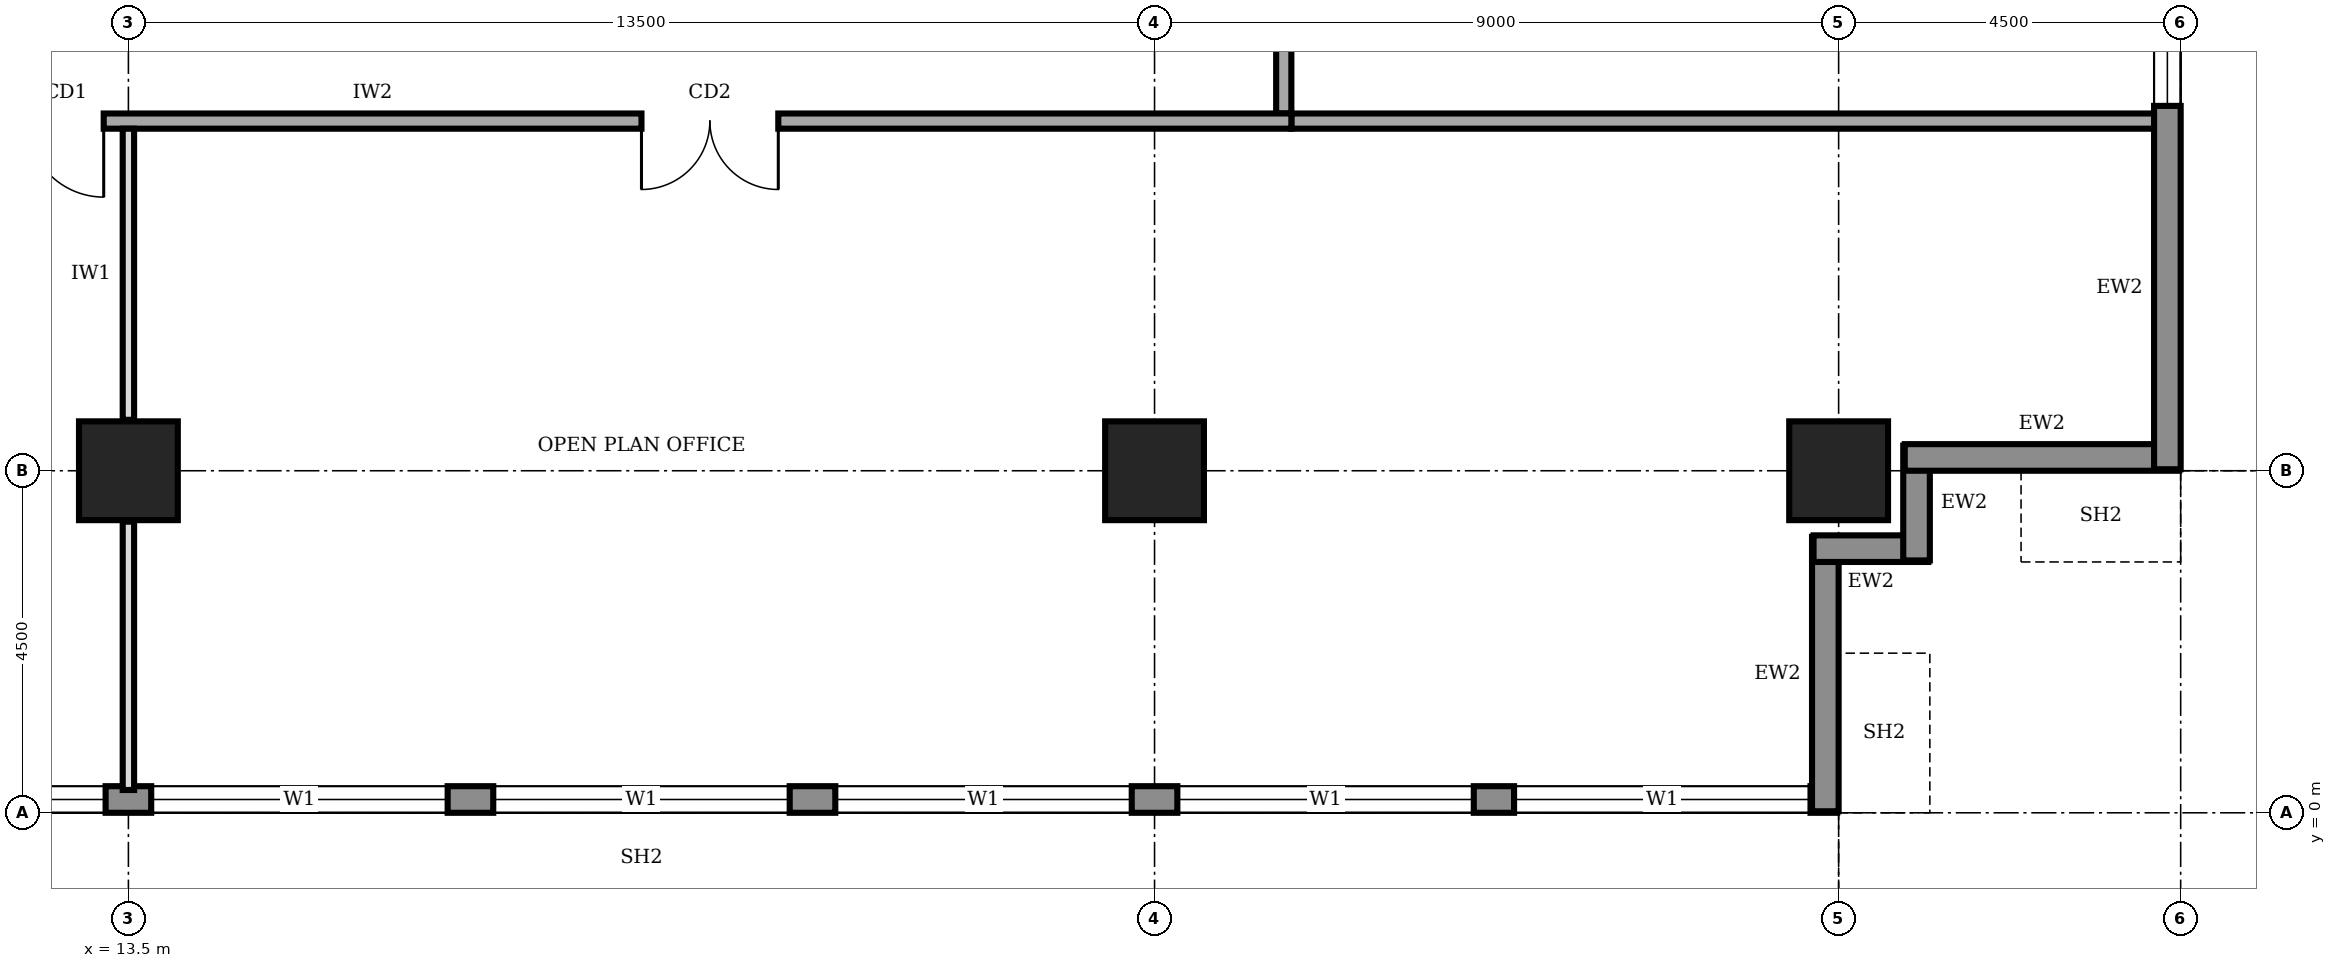
"""IFC4 building model, lengths in metres.
Left out: names, types, materials, properties, quantities, classifications, styles, units other than length and angle.
Written with IfcOpenShell. Run it as: python <this file> out.ifc"""

import sys

from ifc_helpers import new_model, si_unit, direction, frame, frame_2d, origin, origin_2d, place, context, subcontext, project, spatial, rectangle, extrude, element, fill, save


model = new_model("IFC4")
c1 = context("Model", 3, precision=1e-05, world=origin(), true_north=direction((0.0, 1.0)))
c2 = subcontext(c1, "Body", "Model", "MODEL_VIEW")
j1 = project(units=[si_unit("LENGTHUNIT", "METRE"), si_unit("PLANEANGLEUNIT", "RADIAN")], contexts=[c1])
p1 = place(None, origin())
s1 = spatial("IfcSite", under=j1, at=p1, CompositionType="ELEMENT")
p2 = place(p1, origin())
s2 = spatial("IfcBuilding", under=s1, at=p2, CompositionType="ELEMENT")
p3 = place(p2, frame((0.0, 0.0, 273.0)))
s3 = spatial("IfcBuildingStorey", under=s2, at=p3, CompositionType="ELEMENT", Elevation=273.0)
for number, where, z_axis, x_axis in (
    (1, (13.5, 4.5, 0.0), (0.0, 0.0, 1.0), (1.0, 0.0, 0.0)),
    (2, (27.0, 4.5, 0.0), (0.0, 0.0, 1.0), (1.0, 0.0, 0.0)),
    (3, (36.0, 4.5, 0.0), (0.0, 0.0, 1.0), (1.0, 0.0, 0.0)),
):
    element("IfcColumn", number, at=place(p3, frame(where, z_axis=z_axis, x_axis=x_axis)), inside=s3, PredefinedType="COLUMN", context=c2, shape_type="SweptSolid", body=[
        extrude(rectangle(XDim=1.3, YDim=1.3, at=origin_2d()), origin(), (0.0, 0.0, 1.0), 4.0),
    ])
p4 = place(p3, frame((4.52, 0.175, 0.0), z_axis=(0.0, 0.0, 1.0), x_axis=(1.0, 0.0, 0.0)))
e4 = element("IfcWall", 4, at=p4, inside=s3, PredefinedType="STANDARD", context=c2, shape_type="SweptSolid", body=[
    extrude(rectangle(XDim=31.46, YDim=0.35, at=frame_2d((15.73, 0.0))), origin(), (0.0, 0.0, 1.0), 3.75),
])
p5 = place(p4, frame((4.78, 0.0, 0.9)))
e5 = element("IfcOpeningElement", 5, at=p5, cuts=e4, PredefinedType="OPENING", context=c2, shape_type="SweptSolid", body=[
    extrude(rectangle(XDim=3.9, YDim=2.2, at=frame_2d((1.95, 1.1))), frame((0.0, 0.185, 0.0), z_axis=(0.0, -1.0, 0.0), x_axis=(1.0, 0.0, 0.0)), (0.0, 0.0, 1.0), 0.37),
])
p6 = place(p4, frame((9.28, 0.0, 0.9)))
e6 = element("IfcOpeningElement", 6, at=p6, cuts=e4, PredefinedType="OPENING", context=c2, shape_type="SweptSolid", body=[
    extrude(rectangle(XDim=3.9, YDim=2.2, at=frame_2d((1.95, 1.1))), frame((0.0, 0.185, 0.0), z_axis=(0.0, -1.0, 0.0), x_axis=(1.0, 0.0, 0.0)), (0.0, 0.0, 1.0), 0.37),
])
p7 = place(p4, frame((13.78, 0.0, 0.9)))
e7 = element("IfcOpeningElement", 7, at=p7, cuts=e4, PredefinedType="OPENING", context=c2, shape_type="SweptSolid", body=[
    extrude(rectangle(XDim=3.9, YDim=2.2, at=frame_2d((1.95, 1.1))), frame((0.0, 0.185, 0.0), z_axis=(0.0, -1.0, 0.0), x_axis=(1.0, 0.0, 0.0)), (0.0, 0.0, 1.0), 0.37),
])
p8 = place(p4, frame((18.28, 0.0, 0.9)))
e8 = element("IfcOpeningElement", 8, at=p8, cuts=e4, PredefinedType="OPENING", context=c2, shape_type="SweptSolid", body=[
    extrude(rectangle(XDim=3.9, YDim=2.2, at=frame_2d((1.95, 1.1))), frame((0.0, 0.185, 0.0), z_axis=(0.0, -1.0, 0.0), x_axis=(1.0, 0.0, 0.0)), (0.0, 0.0, 1.0), 0.37),
])
p9 = place(p4, frame((22.78, 0.0, 0.9)))
e9 = element("IfcOpeningElement", 9, at=p9, cuts=e4, PredefinedType="OPENING", context=c2, shape_type="SweptSolid", body=[
    extrude(rectangle(XDim=3.9, YDim=2.2, at=frame_2d((1.95, 1.1))), frame((0.0, 0.185, 0.0), z_axis=(0.0, -1.0, 0.0), x_axis=(1.0, 0.0, 0.0)), (0.0, 0.0, 1.0), 0.37),
])
p10 = place(p4, frame((27.21, 0.0, 0.9)))
e10 = element("IfcOpeningElement", 10, at=p10, cuts=e4, PredefinedType="OPENING", context=c2, shape_type="SweptSolid", body=[
    extrude(rectangle(XDim=3.9, YDim=2.2, at=frame_2d((1.95, 1.1))), frame((0.0, 0.185, 0.0), z_axis=(0.0, -1.0, 0.0), x_axis=(1.0, 0.0, 0.0)), (0.0, 0.0, 1.0), 0.37),
])
p11 = place(p3, frame((35.825, 0.02, 0.0), z_axis=(0.0, 0.0, 1.0), x_axis=(0.0, 1.0, 0.0)))
e11 = element("IfcWall", 11, at=p11, inside=s3, PredefinedType="STANDARD", context=c2, shape_type="SweptSolid", body=[
    extrude(rectangle(XDim=3.61, YDim=0.35, at=frame_2d((1.805, 0.0))), origin(), (0.0, 0.0, 1.0), 2.85),
])
for number, where, z_axis, x_axis in (
    (12, (35.67, 3.475, 0.0), (0.0, 0.0, 1.0), (1.0, 0.0, 0.0)),
    (13, (37.025, 3.32, 0.0), (0.0, 0.0, 1.0), (0.0, 1.0, 0.0)),
):
    element("IfcWall", number, at=place(p3, frame(where, z_axis=z_axis, x_axis=x_axis)), inside=s3, PredefinedType="STANDARD", context=c2, shape_type="SweptSolid", body=[
        extrude(rectangle(XDim=1.51, YDim=0.35, at=frame_2d((0.755, 0.0))), origin(), (0.0, 0.0, 1.0), 3.75),
    ])
p12 = place(p3, frame((36.87, 4.675, 0.0), z_axis=(0.0, 0.0, 1.0), x_axis=(1.0, 0.0, 0.0)))
e14 = element("IfcWall", 14, at=p12, inside=s3, PredefinedType="STANDARD", context=c2, shape_type="SweptSolid", body=[
    extrude(rectangle(XDim=3.61, YDim=0.35, at=frame_2d((1.805, 0.0))), origin(), (0.0, 0.0, 1.0), 2.85),
])
p13 = place(p3, frame((40.325, 4.52, 0.0), z_axis=(0.0, 0.0, 1.0), x_axis=(0.0, 1.0, 0.0)))
e15 = element("IfcWall", 15, at=p13, inside=s3, PredefinedType="STANDARD", context=c2, shape_type="SweptSolid", body=[
    extrude(rectangle(XDim=31.46, YDim=0.35, at=frame_2d((15.73, 0.0))), origin(), (0.0, 0.0, 1.0), 3.75),
])
p14 = place(p13, frame((4.78, 0.0, 0.9)))
e16 = element("IfcOpeningElement", 16, at=p14, cuts=e15, PredefinedType="OPENING", context=c2, shape_type="SweptSolid", body=[
    extrude(rectangle(XDim=3.9, YDim=2.2, at=frame_2d((1.95, 1.1))), frame((0.0, 0.185, 0.0), z_axis=(0.0, -1.0, 0.0), x_axis=(1.0, 0.0, 0.0)), (0.0, 0.0, 1.0), 0.37),
])
p15 = place(p13, frame((9.28, 0.0, 0.9)))
e17 = element("IfcOpeningElement", 17, at=p15, cuts=e15, PredefinedType="OPENING", context=c2, shape_type="SweptSolid", body=[
    extrude(rectangle(XDim=3.9, YDim=2.2, at=frame_2d((1.95, 1.1))), frame((0.0, 0.185, 0.0), z_axis=(0.0, -1.0, 0.0), x_axis=(1.0, 0.0, 0.0)), (0.0, 0.0, 1.0), 0.37),
])
p16 = place(p13, frame((13.78, 0.0, 0.9)))
e18 = element("IfcOpeningElement", 18, at=p16, cuts=e15, PredefinedType="OPENING", context=c2, shape_type="SweptSolid", body=[
    extrude(rectangle(XDim=3.9, YDim=2.2, at=frame_2d((1.95, 1.1))), frame((0.0, 0.185, 0.0), z_axis=(0.0, -1.0, 0.0), x_axis=(1.0, 0.0, 0.0)), (0.0, 0.0, 1.0), 0.37),
])
p17 = place(p13, frame((18.28, 0.0, 0.9)))
e19 = element("IfcOpeningElement", 19, at=p17, cuts=e15, PredefinedType="OPENING", context=c2, shape_type="SweptSolid", body=[
    extrude(rectangle(XDim=3.9, YDim=2.2, at=frame_2d((1.95, 1.1))), frame((0.0, 0.185, 0.0), z_axis=(0.0, -1.0, 0.0), x_axis=(1.0, 0.0, 0.0)), (0.0, 0.0, 1.0), 0.37),
])
p18 = place(p13, frame((22.78, 0.0, 0.9)))
e20 = element("IfcOpeningElement", 20, at=p18, cuts=e15, PredefinedType="OPENING", context=c2, shape_type="SweptSolid", body=[
    extrude(rectangle(XDim=3.9, YDim=2.2, at=frame_2d((1.95, 1.1))), frame((0.0, 0.185, 0.0), z_axis=(0.0, -1.0, 0.0), x_axis=(1.0, 0.0, 0.0)), (0.0, 0.0, 1.0), 0.37),
])
p19 = place(p13, frame((27.21, 0.0, 0.9)))
e21 = element("IfcOpeningElement", 21, at=p19, cuts=e15, PredefinedType="OPENING", context=c2, shape_type="SweptSolid", body=[
    extrude(rectangle(XDim=3.9, YDim=2.2, at=frame_2d((1.95, 1.1))), frame((0.0, 0.185, 0.0), z_axis=(0.0, -1.0, 0.0), x_axis=(1.0, 0.0, 0.0)), (0.0, 0.0, 1.0), 0.37),
])
p20 = place(p3, frame((11.9, 9.1, 0.0), z_axis=(0.0, 0.0, 1.0), x_axis=(1.0, 0.0, 0.0)))
e22 = element("IfcWall", 22, at=p20, inside=s3, PredefinedType="SOLIDWALL", context=c2, shape_type="SweptSolid", body=[
    extrude(rectangle(XDim=16.9, YDim=0.2, at=frame_2d((8.45, 0.0))), origin(), (0.0, 0.0, 1.0), 3.75),
])
p21 = place(p20, frame((0.275, 0.0, 0.0)))
e23 = element("IfcOpeningElement", 23, at=p21, cuts=e22, PredefinedType="OPENING", context=c2, shape_type="SweptSolid", body=[
    extrude(rectangle(XDim=1.0, YDim=2.1, at=frame_2d((0.5, 1.05))), frame((0.0, 0.11, 0.0), z_axis=(0.0, -1.0, 0.0), x_axis=(1.0, 0.0, 0.0)), (0.0, 0.0, 1.0), 0.22),
])
p22 = place(p20, frame((8.35, 0.0, 0.0)))
e24 = element("IfcOpeningElement", 24, at=p22, cuts=e22, PredefinedType="OPENING", context=c2, shape_type="SweptSolid", body=[
    extrude(rectangle(XDim=1.8, YDim=2.1, at=frame_2d((0.9, 1.05))), frame((0.0, 0.11, 0.0), z_axis=(0.0, -1.0, 0.0), x_axis=(1.0, 0.0, 0.0)), (0.0, 0.0, 1.0), 0.22),
])
p23 = place(p3, frame((28.7, 9.2, 0.0), z_axis=(0.0, 0.0, 1.0), x_axis=(0.0, 1.0, 0.0)))
e25 = element("IfcWall", 25, at=p23, inside=s3, PredefinedType="SOLIDWALL", context=c2, shape_type="SweptSolid", body=[
    extrude(rectangle(XDim=23.8, YDim=0.2, at=frame_2d((11.9, 0.0))), origin(), (0.0, 0.0, 1.0), 3.75),
])
p24 = place(p23, frame((3.4, 0.0, 0.0)))
e26 = element("IfcOpeningElement", 26, at=p24, cuts=e25, PredefinedType="OPENING", context=c2, shape_type="SweptSolid", body=[
    extrude(rectangle(XDim=1.8, YDim=2.1, at=frame_2d((0.9, 1.05))), frame((0.0, 0.11, 0.0), z_axis=(0.0, -1.0, 0.0), x_axis=(1.0, 0.0, 0.0)), (0.0, 0.0, 1.0), 0.22),
])
p25 = place(p23, frame((10.55, 0.0, 0.0)))
e27 = element("IfcOpeningElement", 27, at=p25, cuts=e25, PredefinedType="OPENING", context=c2, shape_type="SweptSolid", body=[
    extrude(rectangle(XDim=1.0, YDim=2.1, at=frame_2d((0.5, 1.05))), frame((0.0, 0.11, 0.0), z_axis=(0.0, -1.0, 0.0), x_axis=(1.0, 0.0, 0.0)), (0.0, 0.0, 1.0), 0.22),
])
p26 = place(p23, frame((17.65, 0.0, 0.0)))
e28 = element("IfcOpeningElement", 28, at=p26, cuts=e25, PredefinedType="OPENING", context=c2, shape_type="SweptSolid", body=[
    extrude(rectangle(XDim=1.8, YDim=2.1, at=frame_2d((0.9, 1.05))), frame((0.0, 0.11, 0.0), z_axis=(0.0, -1.0, 0.0), x_axis=(1.0, 0.0, 0.0)), (0.0, 0.0, 1.0), 0.22),
])
p27 = place(p3, frame((28.8, 9.1, 0.0), z_axis=(0.0, 0.0, 1.0), x_axis=(1.0, 0.0, 0.0)))
e29 = element("IfcWall", 29, at=p27, inside=s3, PredefinedType="SOLIDWALL", context=c2, shape_type="SweptSolid", body=[
    extrude(rectangle(XDim=11.4, YDim=0.2, at=frame_2d((5.7, 0.0))), origin(), (0.0, 0.0, 1.0), 3.75),
])
p28 = place(p3, frame((13.5, 0.3, 0.0), z_axis=(0.0, 0.0, 1.0), x_axis=(0.0, 1.0, 0.0)))
e30 = element("IfcWall", 30, at=p28, inside=s3, PredefinedType="PARTITIONING", context=c2, shape_type="SweptSolid", body=[
    extrude(rectangle(XDim=3.53, YDim=0.15, at=frame_2d((1.765, 0.0))), origin(), (0.0, 0.0, 1.0), 2.85),
])
p29 = place(p3, frame((13.5, 5.17, 0.0), z_axis=(0.0, 0.0, 1.0), x_axis=(0.0, 1.0, 0.0)))
e31 = element("IfcWall", 31, at=p29, inside=s3, PredefinedType="PARTITIONING", context=c2, shape_type="SweptSolid", body=[
    extrude(rectangle(XDim=3.83, YDim=0.15, at=frame_2d((1.915, 0.0))), origin(), (0.0, 0.0, 1.0), 2.85),
])
p30 = place(p5, origin())
e32 = element("IfcWindow", 32, at=p30, inside=s3, PartitioningType="SINGLE_PANEL", PredefinedType="WINDOW", context=c2, shape_type="SweptSolid", body=[
    extrude(rectangle(XDim=3.9, YDim=2.2, at=frame_2d((1.95, 1.1))), frame((0.0, 0.03, 0.0), z_axis=(0.0, -1.0, 0.0), x_axis=(1.0, 0.0, 0.0)), (0.0, 0.0, 1.0), 0.06),
])
fill(e5, e32)
p31 = place(p6, origin())
e33 = element("IfcWindow", 33, at=p31, inside=s3, PartitioningType="SINGLE_PANEL", PredefinedType="WINDOW", context=c2, shape_type="SweptSolid", body=[
    extrude(rectangle(XDim=3.9, YDim=2.2, at=frame_2d((1.95, 1.1))), frame((0.0, 0.03, 0.0), z_axis=(0.0, -1.0, 0.0), x_axis=(1.0, 0.0, 0.0)), (0.0, 0.0, 1.0), 0.06),
])
fill(e6, e33)
p32 = place(p7, origin())
e34 = element("IfcWindow", 34, at=p32, inside=s3, PartitioningType="SINGLE_PANEL", PredefinedType="WINDOW", context=c2, shape_type="SweptSolid", body=[
    extrude(rectangle(XDim=3.9, YDim=2.2, at=frame_2d((1.95, 1.1))), frame((0.0, 0.03, 0.0), z_axis=(0.0, -1.0, 0.0), x_axis=(1.0, 0.0, 0.0)), (0.0, 0.0, 1.0), 0.06),
])
fill(e7, e34)
p33 = place(p8, origin())
e35 = element("IfcWindow", 35, at=p33, inside=s3, PartitioningType="SINGLE_PANEL", PredefinedType="WINDOW", context=c2, shape_type="SweptSolid", body=[
    extrude(rectangle(XDim=3.9, YDim=2.2, at=frame_2d((1.95, 1.1))), frame((0.0, 0.03, 0.0), z_axis=(0.0, -1.0, 0.0), x_axis=(1.0, 0.0, 0.0)), (0.0, 0.0, 1.0), 0.06),
])
fill(e8, e35)
p34 = place(p9, origin())
e36 = element("IfcWindow", 36, at=p34, inside=s3, PartitioningType="SINGLE_PANEL", PredefinedType="WINDOW", context=c2, shape_type="SweptSolid", body=[
    extrude(rectangle(XDim=3.9, YDim=2.2, at=frame_2d((1.95, 1.1))), frame((0.0, 0.03, 0.0), z_axis=(0.0, -1.0, 0.0), x_axis=(1.0, 0.0, 0.0)), (0.0, 0.0, 1.0), 0.06),
])
fill(e9, e36)
p35 = place(p10, origin())
e37 = element("IfcWindow", 37, at=p35, inside=s3, PartitioningType="SINGLE_PANEL", PredefinedType="WINDOW", context=c2, shape_type="SweptSolid", body=[
    extrude(rectangle(XDim=3.9, YDim=2.2, at=frame_2d((1.95, 1.1))), frame((0.0, 0.03, 0.0), z_axis=(0.0, -1.0, 0.0), x_axis=(1.0, 0.0, 0.0)), (0.0, 0.0, 1.0), 0.06),
])
fill(e10, e37)
p36 = place(p14, origin())
e38 = element("IfcWindow", 38, at=p36, inside=s3, PartitioningType="SINGLE_PANEL", PredefinedType="WINDOW", context=c2, shape_type="SweptSolid", body=[
    extrude(rectangle(XDim=3.9, YDim=2.2, at=frame_2d((1.95, 1.1))), frame((0.0, 0.03, 0.0), z_axis=(0.0, -1.0, 0.0), x_axis=(1.0, 0.0, 0.0)), (0.0, 0.0, 1.0), 0.06),
])
fill(e16, e38)
p37 = place(p21, frame((1.0, 0.0, 0.0), z_axis=(0.0, 0.0, 1.0), x_axis=(-1.0, 0.0, 0.0)))
e39 = element("IfcDoor", 39, at=p37, inside=s3, OperationType="SINGLE_SWING_LEFT", PredefinedType="DOOR", context=c2, shape_type="SweptSolid", body=[
    extrude(rectangle(XDim=1.0, YDim=2.1, at=frame_2d((0.5, 1.05))), frame((0.0, 0.025, 0.0), z_axis=(0.0, -1.0, 0.0), x_axis=(1.0, 0.0, 0.0)), (0.0, 0.0, 1.0), 0.05),
])
fill(e23, e39)
p38 = place(p22, frame((1.8, 0.0, 0.0), z_axis=(0.0, 0.0, 1.0), x_axis=(-1.0, 0.0, 0.0)))
e40 = element("IfcDoor", 40, at=p38, inside=s3, OperationType="DOUBLE_DOOR_SINGLE_SWING", PredefinedType="DOOR", context=c2, shape_type="SweptSolid", body=[
    extrude(rectangle(XDim=1.8, YDim=2.1, at=frame_2d((0.9, 1.05))), frame((0.0, 0.025, 0.0), z_axis=(0.0, -1.0, 0.0), x_axis=(1.0, 0.0, 0.0)), (0.0, 0.0, 1.0), 0.05),
])
fill(e24, e40)
save(model, sys.argv[1])
